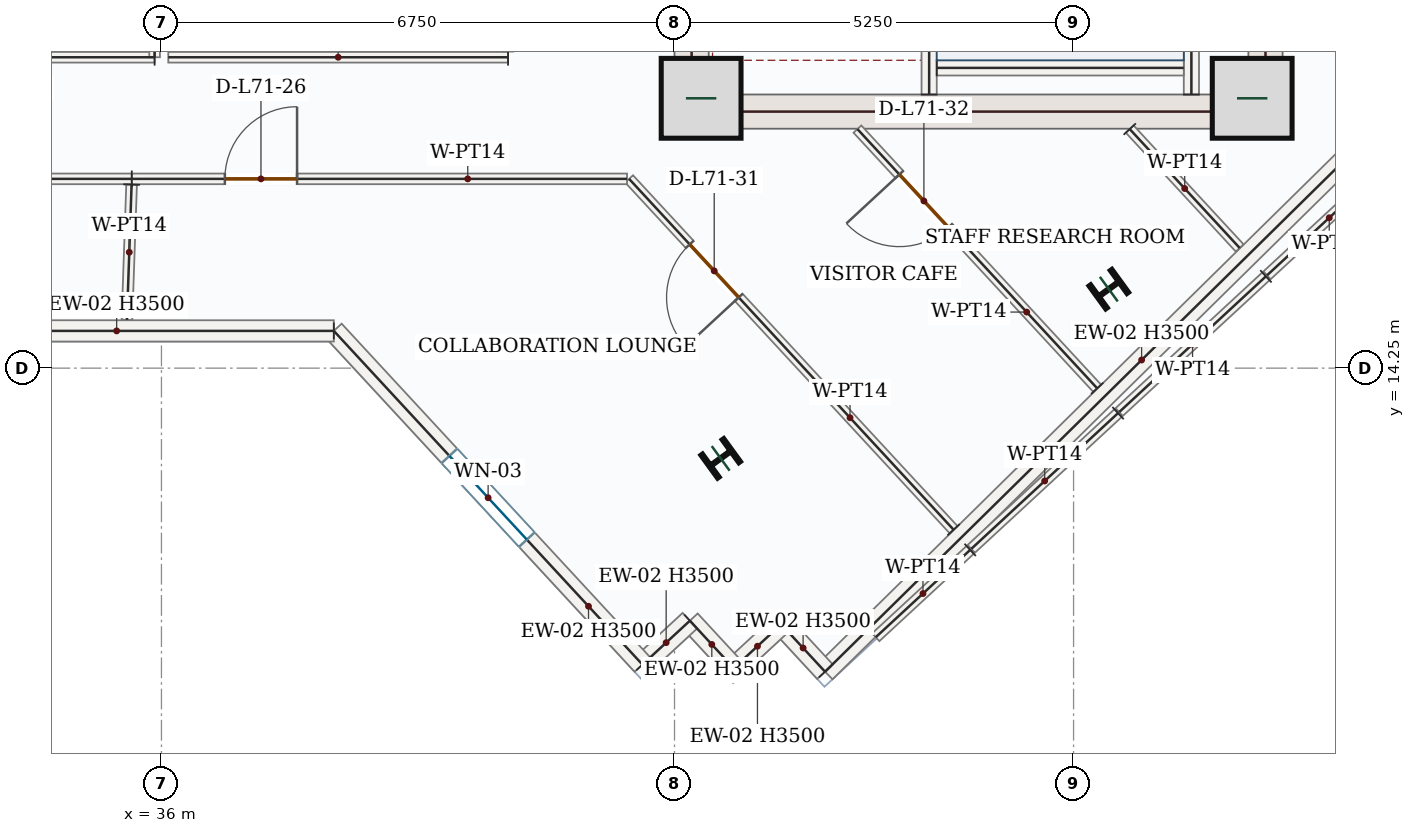
"""IFC4 building model, lengths in metres.
Left out: names, types, materials, properties, quantities, classifications, styles, units other than length and angle.
Written with IfcOpenShell. Run it as: python <this file> out.ifc"""

import sys

from ifc_helpers import new_model, si_unit, direction, frame, frame_2d, origin, origin_2d, place, context, subcontext, project, spatial, rectangle, i_section, extrude, source, transform, mapped, element, fill, save


model = new_model("IFC4")
c1 = context("Model", 3, precision=1e-05, world=origin(), true_north=direction((0.0, 1.0)))
c2 = subcontext(c1, "Body", "Model", "MODEL_VIEW")
j1 = project(units=[si_unit("LENGTHUNIT", "METRE"), si_unit("PLANEANGLEUNIT", "RADIAN")], contexts=[c1])
p1 = place(None, origin())
s1 = spatial("IfcSite", under=j1, at=p1, CompositionType="ELEMENT")
p2 = place(p1, origin())
s2 = spatial("IfcBuilding", under=s1, at=p2, CompositionType="ELEMENT")
p3 = place(p2, frame((0.0, 0.0, 295.35)))
s3 = spatial("IfcBuildingStorey", under=s2, at=p3, CompositionType="ELEMENT", Elevation=295.35)
p4 = place(p3, frame((42.975, 17.4, 0.0), z_axis=(0.0, 0.0, 1.0), x_axis=(0.0, 1.0, 0.0)))
e1 = element("IfcWall", 1, at=p4, inside=s3, PredefinedType="SHEAR", context=c2, shape_type="SweptSolid", body=[
    extrude(rectangle(XDim=8.55, YDim=0.45, at=frame_2d((4.275, 0.0))), origin(), (0.0, 0.0, 1.0), 3.5),
])
p5 = place(p4, frame((6.65, 0.0, 0.0)))
e2 = element("IfcOpeningElement", 2, at=p5, cuts=e1, PredefinedType="OPENING", context=c2, shape_type="SweptSolid", body=[
    extrude(rectangle(XDim=1.1, YDim=2.2, at=frame_2d((0.55, 1.1))), frame((0.0, 0.235, 0.0), z_axis=(0.0, -1.0, 0.0), x_axis=(1.0, 0.0, 0.0)), (0.0, 0.0, 1.0), 0.47),
])
p6 = place(p4, frame((1.75, 0.0, 0.0)))
e3 = element("IfcOpeningElement", 3, at=p6, cuts=e1, PredefinedType="OPENING", context=c2, shape_type="SweptSolid", body=[
    extrude(rectangle(XDim=1.3, YDim=2.2, at=frame_2d((0.65, 1.1))), frame((0.0, 0.235, 0.0), z_axis=(0.0, -1.0, 0.0), x_axis=(1.0, 0.0, 0.0)), (0.0, 0.0, 1.0), 0.47),
])
p7 = place(p4, frame((4.55, 0.0, 0.0)))
e4 = element("IfcOpeningElement", 4, at=p7, cuts=e1, PredefinedType="OPENING", context=c2, shape_type="SweptSolid", body=[
    extrude(rectangle(XDim=0.88, YDim=2.1, at=frame_2d((0.44, 1.05))), frame((0.0, 0.235, 0.0), z_axis=(0.0, -1.0, 0.0), x_axis=(1.0, 0.0, 0.0)), (0.0, 0.0, 1.0), 0.47),
])
m1 = source(origin(), c2, "Body", "SweptSolid", [
    extrude(rectangle(XDim=8.55, YDim=0.45, at=frame_2d((4.275, 0.0))), origin(), (0.0, 0.0, 1.0), 3.5),
])
p8 = place(p3, frame((50.525, 17.4, 0.0), z_axis=(0.0, 0.0, 1.0), x_axis=(0.0, 1.0, 0.0)))
e5 = element("IfcWall", 5, at=p8, inside=s3, PredefinedType="SHEAR", context=c2, shape_type="MappedRepresentation", body=[
    mapped(m1, transform((0.0, 0.0, 0.0), x_axis=(1.0, 0.0, 0.0), y_axis=(0.0, 1.0, 0.0), z_axis=(0.0, 0.0, 1.0), scale=1.0)),
])
m2 = source(origin(), c2, "Body", "SweptSolid", [
    extrude(rectangle(XDim=7.1, YDim=0.45, at=frame_2d((3.55, 0.0))), origin(), (0.0, 0.0, 1.0), 3.5),
])
p9 = place(p3, frame((43.2, 17.625, 0.0), z_axis=(0.0, 0.0, 1.0), x_axis=(1.0, 0.0, 0.0)))
e6 = element("IfcWall", 6, at=p9, inside=s3, PredefinedType="SHEAR", context=c2, shape_type="MappedRepresentation", body=[
    mapped(m2, transform((0.0, 0.0, 0.0), x_axis=(1.0, 0.0, 0.0), y_axis=(0.0, 1.0, 0.0), z_axis=(0.0, 0.0, 1.0), scale=1.0)),
])
m3 = source(origin(), c2, "Body", "SweptSolid", [
    extrude(rectangle(XDim=1.05, YDim=1.05, at=origin_2d()), origin(), (0.0, 0.0, 1.0), 3.75),
])
for number, where, z_axis, x_axis in (
    (7, (43.1, 17.8, 0.0), (0.0, 0.0, 1.0), (1.0, 0.0, 0.0)),
    (8, (50.35, 17.8, 0.0), (0.0, 0.0, 1.0), (1.0, 0.0, 0.0)),
):
    element("IfcColumn", number, at=place(p3, frame(where, z_axis=z_axis, x_axis=x_axis)), inside=s3, PredefinedType="COLUMN", context=c2, shape_type="MappedRepresentation", body=[
        mapped(m3, transform((0.0, 0.0, 0.0), x_axis=(1.0, 0.0, 0.0), y_axis=(0.0, 1.0, 0.0), z_axis=(0.0, 0.0, 1.0), scale=1.0)),
    ])
m4 = source(origin(), c2, "Body", "SweptSolid", [
    extrude(i_section(OverallWidth=0.374, OverallDepth=0.372, WebThickness=0.016, FlangeThickness=0.026, FilletRadius=0.018, at=origin_2d()), origin(), (0.0, 0.0, 1.0), 3.75),
])
for number, where, z_axis, x_axis in (
    (9, (43.357, 13.063, 0.0), (0.0, 0.0, 1.0), (-0.588, 0.809, 0.0)),
    (10, (48.464, 15.289, 0.0), (0.0, 0.0, 1.0), (-0.588, 0.809, 0.0)),
):
    element("IfcColumn", number, at=place(p3, frame(where, z_axis=z_axis, x_axis=x_axis)), inside=s3, PredefinedType="COLUMN", context=c2, shape_type="MappedRepresentation", body=[
        mapped(m4, transform((0.0, 0.0, 0.0), x_axis=(1.0, 0.0, 0.0), y_axis=(0.0, 1.0, 0.0), z_axis=(0.0, 0.0, 1.0), scale=1.0)),
    ])
m5 = source(origin(), c2, "Body", "SweptSolid", [
    extrude(rectangle(XDim=11.69, YDim=0.28, at=frame_2d((5.845, 0.0))), origin(), (0.0, 0.0, 1.0), 3.5),
])
p10 = place(p3, frame((53.06, 18.458, 0.0), z_axis=(0.0, 0.0, 1.0), x_axis=(-0.712557502542, -0.701613715353, 0.0)))
e11 = element("IfcWall", 11, at=p10, inside=s3, PredefinedType="SOLIDWALL", context=c2, shape_type="MappedRepresentation", body=[
    mapped(m5, transform((0.0, 0.0, 0.0), x_axis=(1.0, 0.0, 0.0), y_axis=(0.0, 1.0, 0.0), z_axis=(0.0, 0.0, 1.0), scale=1.0)),
])
m6 = source(origin(), c2, "Body", "SweptSolid", [
    extrude(rectangle(XDim=0.85, YDim=0.28, at=frame_2d((0.425, 0.0))), origin(), (0.0, 0.0, 1.0), 3.5),
])
for number, where, z_axis, x_axis in (
    (12, (44.73, 10.256, 0.0), (0.0, 0.0, 1.0), (-0.679, 0.734, 0.0)),
    (13, (44.153, 10.88, 0.0), (0.0, 0.0, 1.0), (-0.734, -0.679, 0.0)),
    (14, (43.529, 10.303, 0.0), (0.0, 0.0, 1.0), (-0.679, 0.734, 0.0)),
):
    element("IfcWall", number, at=place(p3, frame(where, z_axis=z_axis, x_axis=x_axis)), inside=s3, PredefinedType="SOLIDWALL", context=c2, shape_type="MappedRepresentation", body=[
        mapped(m6, transform((0.0, 0.0, 0.0), x_axis=(1.0, 0.0, 0.0), y_axis=(0.0, 1.0, 0.0), z_axis=(0.0, 0.0, 1.0), scale=1.0)),
    ])
m7 = source(origin(), c2, "Body", "SweptSolid", [
    extrude(rectangle(XDim=0.85, YDim=0.28, at=frame_2d((0.425, 0.0))), origin(), (0.0, 0.0, 1.0), 3.5),
])
p11 = place(p3, frame((42.952, 10.927, 0.0), z_axis=(0.0, 0.0, 1.0), x_axis=(-0.73428557742, -0.678840696183, 0.0)))
e15 = element("IfcWall", 15, at=p11, inside=s3, PredefinedType="SOLIDWALL", context=c2, shape_type="MappedRepresentation", body=[
    mapped(m7, transform((0.0, 0.0, 0.0), x_axis=(1.0, 0.0, 0.0), y_axis=(0.0, 1.0, 0.0), z_axis=(0.0, 0.0, 1.0), scale=1.0)),
])
p12 = place(p3, frame((42.328, 10.35, 0.0), z_axis=(0.0, 0.0, 1.0), x_axis=(-0.679010627727, 0.734128440693, 0.0)))
e16 = element("IfcWall", 16, at=p12, inside=s3, PredefinedType="SOLIDWALL", context=c2, shape_type="SweptSolid", body=[
    extrude(rectangle(XDim=5.98, YDim=0.28, at=frame_2d((2.99, 0.0))), origin(), (0.0, 0.0, 1.0), 3.5),
])
p13 = place(p12, frame((2.24, 0.0, 0.85)))
e17 = element("IfcOpeningElement", 17, at=p13, cuts=e16, PredefinedType="OPENING", context=c2, shape_type="SweptSolid", body=[
    extrude(rectangle(XDim=1.5, YDim=1.5, at=frame_2d((0.75, 0.75))), frame((0.0, 0.15, 0.0), z_axis=(0.0, -1.0, 0.0), x_axis=(1.0, 0.0, 0.0)), (0.0, 0.0, 1.0), 0.3),
])
m8 = source(origin(), c2, "Body", "SweptSolid", [
    extrude(rectangle(XDim=5.714, YDim=0.28, at=frame_2d((2.857, 0.0))), origin(), (0.0, 0.0, 1.0), 3.5),
])
p14 = place(p3, frame((38.268, 14.74, 0.0), z_axis=(0.0, 0.0, 1.0), x_axis=(-1.0, 0.0, 0.0)))
e18 = element("IfcWall", 18, at=p14, inside=s3, PredefinedType="SOLIDWALL", context=c2, shape_type="MappedRepresentation", body=[
    mapped(m8, transform((0.0, 0.0, 0.0), x_axis=(1.0, 0.0, 0.0), y_axis=(0.0, 1.0, 0.0), z_axis=(0.0, 0.0, 1.0), scale=1.0)),
])
m9 = source(origin(), c2, "Body", "SweptSolid", [
    extrude(rectangle(XDim=7.87, YDim=0.2, at=frame_2d((3.935, 0.0))), origin(), (0.0, 0.0, 1.0), 3.5),
])
p15 = place(p3, frame((49.55, 17.85, 0.0), z_axis=(0.0, 0.0, 1.0), x_axis=(0.0, 1.0, 0.0)))
e19 = element("IfcWall", 19, at=p15, inside=s3, PredefinedType="SOLIDWALL", context=c2, shape_type="MappedRepresentation", body=[
    mapped(m9, transform((0.0, 0.0, 0.0), x_axis=(1.0, 0.0, 0.0), y_axis=(0.0, 1.0, 0.0), z_axis=(0.0, 0.0, 1.0), scale=1.0)),
])
p16 = place(p3, frame((46.1, 17.85, 0.0), z_axis=(0.0, 0.0, 1.0), x_axis=(0.0, 1.0, 0.0)))
e20 = element("IfcWall", 20, at=p16, inside=s3, PredefinedType="SOLIDWALL", context=c2, shape_type="SweptSolid", body=[
    extrude(rectangle(XDim=8.0, YDim=0.2, at=frame_2d((4.0, 0.0))), origin(), (0.0, 0.0, 1.0), 3.5),
])
p17 = place(p16, frame((6.3, 0.0, 0.0)))
e21 = element("IfcOpeningElement", 21, at=p17, cuts=e20, PredefinedType="OPENING", context=c2, shape_type="SweptSolid", body=[
    extrude(rectangle(XDim=1.05, YDim=2.15, at=frame_2d((0.525, 1.075))), frame((0.0, 0.11, 0.0), z_axis=(0.0, -1.0, 0.0), x_axis=(1.0, 0.0, 0.0)), (0.0, 0.0, 1.0), 0.22),
])
m10 = source(origin(), c2, "Body", "SweptSolid", [
    extrude(rectangle(XDim=3.25, YDim=0.2, at=frame_2d((1.625, 0.0))), origin(), (0.0, 0.0, 1.0), 3.5),
])
p18 = place(p3, frame((46.2, 18.2, 0.0), z_axis=(0.0, 0.0, 1.0), x_axis=(1.0, 0.0, 0.0)))
e22 = element("IfcWall", 22, at=p18, inside=s3, PredefinedType="SOLIDWALL", context=c2, shape_type="MappedRepresentation", body=[
    mapped(m10, transform((0.0, 0.0, 0.0), x_axis=(1.0, 0.0, 0.0), y_axis=(0.0, 1.0, 0.0), z_axis=(0.0, 0.0, 1.0), scale=1.0)),
])
p19 = place(p3, frame((48.311, 13.985, 0.0), z_axis=(0.0, 0.0, 1.0), x_axis=(-0.679002327249, 0.73413611789, 0.0)))
e23 = element("IfcWall", 23, at=p19, inside=s3, PredefinedType="PARTITIONING", context=c2, shape_type="SweptSolid", body=[
    extrude(rectangle(XDim=4.645, YDim=0.14, at=frame_2d((2.323, 0.0))), origin(), (0.0, 0.0, 1.0), 3.5),
])
p20 = place(p19, frame((2.882, 0.0, 0.0)))
e24 = element("IfcOpeningElement", 24, at=p20, cuts=e23, PredefinedType="OPENING", context=c2, shape_type="SweptSolid", body=[
    extrude(rectangle(XDim=0.95, YDim=2.15, at=frame_2d((0.475, 1.075))), frame((0.0, 0.08, 0.0), z_axis=(0.0, -1.0, 0.0), x_axis=(1.0, 0.0, 0.0)), (0.0, 0.0, 1.0), 0.16),
])
m11 = source(origin(), c2, "Body", "SweptSolid", [
    extrude(rectangle(XDim=2.13, YDim=0.14, at=frame_2d((1.065, 0.0))), origin(), (0.0, 0.0, 1.0), 3.5),
])
p21 = place(p3, frame((48.739, 17.395, 0.0), z_axis=(0.0, 0.0, 1.0), x_axis=(0.678946242809, -0.734187986401, 0.0)))
e25 = element("IfcWall", 25, at=p21, inside=s3, PredefinedType="PARTITIONING", context=c2, shape_type="MappedRepresentation", body=[
    mapped(m11, transform((0.0, 0.0, 0.0), x_axis=(1.0, 0.0, 0.0), y_axis=(0.0, 1.0, 0.0), z_axis=(0.0, 0.0, 1.0), scale=1.0)),
])
m12 = source(origin(), c2, "Body", "SweptSolid", [
    extrude(rectangle(XDim=2.63, YDim=0.14, at=frame_2d((1.315, 0.0))), origin(), (0.0, 0.0, 1.0), 3.5),
])
for number, where, z_axis, x_axis in (
    (26, (50.531, 15.458, 0.0), (0.0, 0.0, 1.0), (-0.734, -0.679, 0.0)),
    (27, (48.585, 13.658, 0.0), (0.0, 0.0, 1.0), (-0.734, -0.679, 0.0)),
):
    element("IfcWall", number, at=place(p3, frame(where, z_axis=z_axis, x_axis=x_axis)), inside=s3, PredefinedType="PARTITIONING", context=c2, shape_type="MappedRepresentation", body=[
        mapped(m12, transform((0.0, 0.0, 0.0), x_axis=(1.0, 0.0, 0.0), y_axis=(0.0, 1.0, 0.0), z_axis=(0.0, 0.0, 1.0), scale=1.0)),
    ])
p22 = place(p3, frame((46.421, 12.125, 0.0), z_axis=(0.0, 0.0, 1.0), x_axis=(-0.679016867794, 0.734122669076, 0.0)))
e28 = element("IfcWall", 28, at=p22, inside=s3, PredefinedType="PARTITIONING", context=c2, shape_type="SweptSolid", body=[
    extrude(rectangle(XDim=6.287, YDim=0.14, at=frame_2d((3.143, 0.0))), origin(), (0.0, 0.0, 1.0), 3.5),
])
p23 = place(p22, frame((4.163, 0.0, 0.0)))
e29 = element("IfcOpeningElement", 29, at=p23, cuts=e28, PredefinedType="OPENING", context=c2, shape_type="SweptSolid", body=[
    extrude(rectangle(XDim=0.95, YDim=2.15, at=frame_2d((0.475, 1.075))), frame((0.0, 0.08, 0.0), z_axis=(0.0, -1.0, 0.0), x_axis=(1.0, 0.0, 0.0)), (0.0, 0.0, 1.0), 0.16),
])
m13 = source(origin(), c2, "Body", "SweptSolid", [
    extrude(rectangle(XDim=2.229, YDim=0.14, at=frame_2d((1.115, 0.0))), origin(), (0.0, 0.0, 1.0), 3.5),
])
p24 = place(p3, frame((52.182, 16.985, 0.0), z_axis=(0.0, 0.0, 1.0), x_axis=(-0.734110356631, -0.679030179217, 0.0)))
e30 = element("IfcWall", 30, at=p24, inside=s3, PredefinedType="PARTITIONING", context=c2, shape_type="MappedRepresentation", body=[
    mapped(m13, transform((0.0, 0.0, 0.0), x_axis=(1.0, 0.0, 0.0), y_axis=(0.0, 1.0, 0.0), z_axis=(0.0, 0.0, 1.0), scale=1.0)),
])
m14 = source(origin(), c2, "Body", "SweptSolid", [
    extrude(rectangle(XDim=4.47, YDim=0.14, at=frame_2d((2.235, 0.0))), origin(), (0.0, 0.0, 1.0), 3.5),
])
p25 = place(p3, frame((35.91, 18.34, 0.0), z_axis=(0.0, 0.0, 1.0), x_axis=(-1.0, 0.0, 0.0)))
e31 = element("IfcWall", 31, at=p25, inside=s3, PredefinedType="PARTITIONING", context=c2, shape_type="MappedRepresentation", body=[
    mapped(m14, transform((0.0, 0.0, 0.0), x_axis=(1.0, 0.0, 0.0), y_axis=(0.0, 1.0, 0.0), z_axis=(0.0, 0.0, 1.0), scale=1.0)),
])
m15 = source(origin(), c2, "Body", "SweptSolid", [
    extrude(rectangle(XDim=7.47, YDim=0.14, at=frame_2d((3.735, 0.0))), origin(), (0.0, 0.0, 1.0), 3.5),
])
p26 = place(p3, frame((35.91, 25.81, 0.0), z_axis=(0.0, 0.0, 1.0), x_axis=(0.0, -1.0, 0.0)))
e32 = element("IfcWall", 32, at=p26, inside=s3, PredefinedType="PARTITIONING", context=c2, shape_type="MappedRepresentation", body=[
    mapped(m15, transform((0.0, 0.0, 0.0), x_axis=(1.0, 0.0, 0.0), y_axis=(0.0, 1.0, 0.0), z_axis=(0.0, 0.0, 1.0), scale=1.0)),
])
p27 = place(p3, frame((40.56, 18.34, 0.0), z_axis=(0.0, 0.0, 1.0), x_axis=(-1.0, 0.0, 0.0)))
e33 = element("IfcWall", 33, at=p27, inside=s3, PredefinedType="PARTITIONING", context=c2, shape_type="MappedRepresentation", body=[
    mapped(m14, transform((0.0, 0.0, 0.0), x_axis=(1.0, 0.0, 0.0), y_axis=(0.0, 1.0, 0.0), z_axis=(0.0, 0.0, 1.0), scale=1.0)),
])
p28 = place(p3, frame((29.256, 16.74, 0.0), z_axis=(0.0, 0.0, 1.0), x_axis=(1.0, 0.0, 0.0)))
e34 = element("IfcWall", 34, at=p28, inside=s3, PredefinedType="PARTITIONING", context=c2, shape_type="SweptSolid", body=[
    extrude(rectangle(XDim=6.354, YDim=0.14, at=frame_2d((3.177, 0.0))), origin(), (0.0, 0.0, 1.0), 3.5),
])
p29 = place(p28, frame((4.215, 0.0, 0.0)))
e35 = element("IfcOpeningElement", 35, at=p29, cuts=e34, PredefinedType="OPENING", context=c2, shape_type="SweptSolid", body=[
    extrude(rectangle(XDim=0.95, YDim=2.15, at=frame_2d((0.475, 1.075))), frame((0.0, 0.08, 0.0), z_axis=(0.0, -1.0, 0.0), x_axis=(1.0, 0.0, 0.0)), (0.0, 0.0, 1.0), 0.16),
])
m16 = source(origin(), c2, "Body", "SweptSolid", [
    extrude(rectangle(XDim=1.781, YDim=0.14, at=frame_2d((0.891, 0.0))), origin(), (0.0, 0.0, 1.0), 3.5),
])
p30 = place(p3, frame((35.607, 16.665, 0.0), z_axis=(0.0, 0.0, 1.0), x_axis=(-0.034268709891, -0.999412655274, 0.0)))
e36 = element("IfcWall", 36, at=p30, inside=s3, PredefinedType="PARTITIONING", context=c2, shape_type="MappedRepresentation", body=[
    mapped(m16, transform((0.0, 0.0, 0.0), x_axis=(1.0, 0.0, 0.0), y_axis=(0.0, 1.0, 0.0), z_axis=(0.0, 0.0, 1.0), scale=1.0)),
])
p31 = place(p3, frame((35.61, 16.74, 0.0), z_axis=(0.0, 0.0, 1.0), x_axis=(1.0, 0.0, 0.0)))
e37 = element("IfcWall", 37, at=p31, inside=s3, PredefinedType="PARTITIONING", context=c2, shape_type="SweptSolid", body=[
    extrude(rectangle(XDim=6.515, YDim=0.14, at=frame_2d((3.258, 0.0))), origin(), (0.0, 0.0, 1.0), 3.5),
])
p32 = place(p31, frame((1.224, 0.0, 0.0)))
e38 = element("IfcOpeningElement", 38, at=p32, cuts=e37, PredefinedType="OPENING", context=c2, shape_type="SweptSolid", body=[
    extrude(rectangle(XDim=0.95, YDim=2.15, at=frame_2d((0.475, 1.075))), frame((0.0, 0.08, 0.0), z_axis=(0.0, -1.0, 0.0), x_axis=(1.0, 0.0, 0.0)), (0.0, 0.0, 1.0), 0.16),
])
m17 = source(origin(), c2, "Body", "SweptSolid", [
    extrude(rectangle(XDim=1.692, YDim=0.14, at=frame_2d((0.846, 0.0))), origin(), (0.0, 0.0, 1.0), 3.5),
])
p33 = place(p3, frame((46.64, 11.859, 0.0), z_axis=(0.0, 0.0, 1.0), x_axis=(-0.734194722112, -0.678938958982, 0.0)))
e39 = element("IfcWall", 39, at=p33, inside=s3, PredefinedType="PARTITIONING", context=c2, shape_type="MappedRepresentation", body=[
    mapped(m17, transform((0.0, 0.0, 0.0), x_axis=(1.0, 0.0, 0.0), y_axis=(0.0, 1.0, 0.0), z_axis=(0.0, 0.0, 1.0), scale=1.0)),
])
m18 = source(origin(), c2, "Body", "SweptSolid", [
    extrude(rectangle(XDim=1.5, YDim=1.5, at=frame_2d((0.75, 0.75))), frame((0.0, 0.03, 0.0), z_axis=(0.0, -1.0, 0.0), x_axis=(1.0, 0.0, 0.0)), (0.0, 0.0, 1.0), 0.06),
])
p34 = place(p13, origin())
e40 = element("IfcWindow", 40, at=p34, inside=s3, PartitioningType="SINGLE_PANEL", PredefinedType="WINDOW", context=c2, shape_type="MappedRepresentation", body=[
    mapped(m18, transform((0.0, 0.0, 0.0), x_axis=(1.0, 0.0, 0.0), y_axis=(0.0, 1.0, 0.0), z_axis=(0.0, 0.0, 1.0), scale=1.0)),
])
fill(e17, e40)
m19 = source(origin(), c2, "Body", "SweptSolid", [
    extrude(rectangle(XDim=0.95, YDim=2.15, at=frame_2d((0.475, 1.075))), frame((0.0, 0.025, 0.0), z_axis=(0.0, -1.0, 0.0), x_axis=(1.0, 0.0, 0.0)), (0.0, 0.0, 1.0), 0.05),
])
p35 = place(p32, origin())
e41 = element("IfcDoor", 41, at=p35, inside=s3, OperationType="SINGLE_SWING_RIGHT", PredefinedType="DOOR", context=c2, shape_type="MappedRepresentation", body=[
    mapped(m19, transform((0.0, 0.0, 0.0), x_axis=(1.0, 0.0, 0.0), y_axis=(0.0, 1.0, 0.0), z_axis=(0.0, 0.0, 1.0), scale=1.0)),
])
fill(e38, e41)
p36 = place(p23, origin())
e42 = element("IfcDoor", 42, at=p36, inside=s3, OperationType="SINGLE_SWING_LEFT", PredefinedType="DOOR", context=c2, shape_type="MappedRepresentation", body=[
    mapped(m19, transform((0.0, 0.0, 0.0), x_axis=(1.0, 0.0, 0.0), y_axis=(0.0, 1.0, 0.0), z_axis=(0.0, 0.0, 1.0), scale=1.0)),
])
fill(e29, e42)
p37 = place(p20, origin())
e43 = element("IfcDoor", 43, at=p37, inside=s3, OperationType="SINGLE_SWING_RIGHT", PredefinedType="DOOR", context=c2, shape_type="MappedRepresentation", body=[
    mapped(m19, transform((0.0, 0.0, 0.0), x_axis=(1.0, 0.0, 0.0), y_axis=(0.0, 1.0, 0.0), z_axis=(0.0, 0.0, 1.0), scale=1.0)),
])
fill(e24, e43)
save(model, sys.argv[1])
